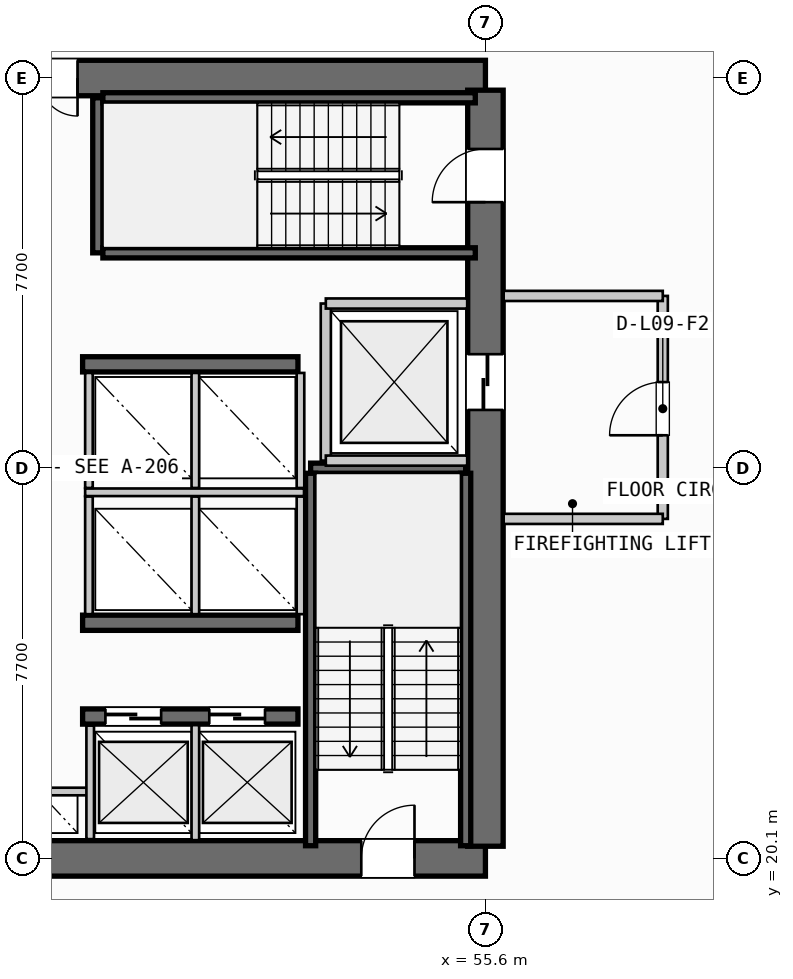
"""IFC4 building model, lengths in metres.
Left out: names, types, materials, properties, quantities, classifications, styles, units other than length and angle.
Written with IfcOpenShell. Run it as: python <this file> out.ifc"""

import sys

from ifc_helpers import new_model, si_unit, direction, frame, frame_2d, origin, place, context, subcontext, project, spatial, rectangle, extrude, source, transform, mapped, element, fill, save


model = new_model("IFC4")
c1 = context("Model", 3, precision=1e-05, world=origin(), true_north=direction((0.0, 1.0)))
c2 = subcontext(c1, "Body", "Model", "MODEL_VIEW")
j1 = project(units=[si_unit("LENGTHUNIT", "METRE"), si_unit("PLANEANGLEUNIT", "RADIAN")], contexts=[c1])
p1 = place(None, origin())
s1 = spatial("IfcSite", under=j1, at=p1, CompositionType="ELEMENT")
p2 = place(p1, origin())
s2 = spatial("IfcBuilding", under=s1, at=p2, CompositionType="ELEMENT")
p3 = place(p2, frame((0.0, 0.0, 41.0)))
s3 = spatial("IfcBuildingStorey", under=s2, at=p3, CompositionType="ELEMENT", Elevation=41.0)
p4 = place(p3, frame((38.0, 20.1, 0.0), z_axis=(0.0, 0.0, 1.0), x_axis=(1.0, 0.0, 0.0)))
e1 = element("IfcWall", 1, at=p4, inside=s3, PredefinedType="SHEAR", context=c2, shape_type="SweptSolid", body=[
    extrude(rectangle(XDim=17.6, YDim=0.7, at=frame_2d((8.8, 0.0))), origin(), (0.0, 0.0, 1.0), 3.55),
])
p5 = place(p4, frame((1.4, 0.0, 0.0)))
e2 = element("IfcOpeningElement", 2, at=p5, cuts=e1, PredefinedType="OPENING", context=c2, shape_type="SweptSolid", body=[
    extrude(rectangle(XDim=1.05, YDim=2.15, at=frame_2d((0.525, 1.075))), frame((0.0, 0.36, 0.0), z_axis=(0.0, -1.0, 0.0), x_axis=(1.0, 0.0, 0.0)), (0.0, 0.0, 1.0), 0.72),
])
p6 = place(p4, frame((15.15, 0.0, 0.0)))
e3 = element("IfcOpeningElement", 3, at=p6, cuts=e1, PredefinedType="OPENING", context=c2, shape_type="SweptSolid", body=[
    extrude(rectangle(XDim=1.05, YDim=2.15, at=frame_2d((0.525, 1.075))), frame((0.0, 0.36, 0.0), z_axis=(0.0, -1.0, 0.0), x_axis=(1.0, 0.0, 0.0)), (0.0, 0.0, 1.0), 0.72),
])
p7 = place(p3, frame((55.6, 35.5, 0.0), z_axis=(0.0, 0.0, 1.0), x_axis=(-1.0, 0.0, 0.0)))
e4 = element("IfcWall", 4, at=p7, inside=s3, PredefinedType="SHEAR", context=c2, shape_type="SweptSolid", body=[
    extrude(rectangle(XDim=17.6, YDim=0.7, at=frame_2d((8.8, 0.0))), origin(), (0.0, 0.0, 1.0), 3.55),
])
p8 = place(p7, frame((8.05, 0.0, 0.0)))
e5 = element("IfcOpeningElement", 5, at=p8, cuts=e4, PredefinedType="OPENING", context=c2, shape_type="SweptSolid", body=[
    extrude(rectangle(XDim=1.5, YDim=2.2, at=frame_2d((0.75, 1.1))), frame((0.0, 0.36, 0.0), z_axis=(0.0, -1.0, 0.0), x_axis=(1.0, 0.0, 0.0)), (0.0, 0.0, 1.0), 0.72),
])
p9 = place(p7, frame((14.95, 0.0, 0.0)))
e6 = element("IfcOpeningElement", 6, at=p9, cuts=e4, PredefinedType="OPENING", context=c2, shape_type="SweptSolid", body=[
    extrude(rectangle(XDim=1.4, YDim=2.3, at=frame_2d((0.7, 1.15))), frame((0.0, 0.36, 0.0), z_axis=(0.0, -1.0, 0.0), x_axis=(1.0, 0.0, 0.0)), (0.0, 0.0, 1.0), 0.72),
])
p10 = place(p7, frame((12.9, 0.0, 0.0)))
e7 = element("IfcOpeningElement", 7, at=p10, cuts=e4, PredefinedType="OPENING", context=c2, shape_type="SweptSolid", body=[
    extrude(rectangle(XDim=0.9, YDim=2.15, at=frame_2d((0.45, 1.075))), frame((0.0, 0.36, 0.0), z_axis=(0.0, -1.0, 0.0), x_axis=(1.0, 0.0, 0.0)), (0.0, 0.0, 1.0), 0.72),
])
p11 = place(p7, frame((10.6, 0.0, 0.0)))
e8 = element("IfcOpeningElement", 8, at=p11, cuts=e4, PredefinedType="OPENING", context=c2, shape_type="SweptSolid", body=[
    extrude(rectangle(XDim=0.95, YDim=2.15, at=frame_2d((0.475, 1.075))), frame((0.0, 0.36, 0.0), z_axis=(0.0, -1.0, 0.0), x_axis=(1.0, 0.0, 0.0)), (0.0, 0.0, 1.0), 0.72),
])
p12 = place(p3, frame((55.6, 20.34, 0.0), z_axis=(0.0, 0.0, 1.0), x_axis=(0.0, 1.0, 0.0)))
e9 = element("IfcWall", 9, at=p12, inside=s3, PredefinedType="SHEAR", context=c2, shape_type="SweptSolid", body=[
    extrude(rectangle(XDim=14.92, YDim=0.7, at=frame_2d((7.46, 0.0))), origin(), (0.0, 0.0, 1.0), 3.55),
])
p13 = place(p12, frame((12.71, 0.0, 0.0)))
e10 = element("IfcOpeningElement", 10, at=p13, cuts=e9, PredefinedType="OPENING", context=c2, shape_type="SweptSolid", body=[
    extrude(rectangle(XDim=1.05, YDim=2.15, at=frame_2d((0.525, 1.075))), frame((0.0, 0.36, 0.0), z_axis=(0.0, -1.0, 0.0), x_axis=(1.0, 0.0, 0.0)), (0.0, 0.0, 1.0), 0.72),
])
p14 = place(p12, frame((8.61, 0.0, 0.0)))
e11 = element("IfcOpeningElement", 11, at=p14, cuts=e9, PredefinedType="OPENING", context=c2, shape_type="SweptSolid", body=[
    extrude(rectangle(XDim=1.1, YDim=2.2, at=frame_2d((0.55, 1.1))), frame((0.0, 0.36, 0.0), z_axis=(0.0, -1.0, 0.0), x_axis=(1.0, 0.0, 0.0)), (0.0, 0.0, 1.0), 0.72),
])
p15 = place(p3, frame((47.65, 22.9, 0.0), z_axis=(0.0, 0.0, 1.0), x_axis=(1.0, 0.0, 0.0)))
e12 = element("IfcWall", 12, at=p15, inside=s3, PredefinedType="SHEAR", context=c2, shape_type="SweptSolid", body=[
    extrude(rectangle(XDim=4.25, YDim=0.3, at=frame_2d((2.125, 0.0))), origin(), (0.0, 0.0, 1.0), 3.55),
])
p16 = place(p15, frame((0.45, 0.0, 0.0)))
e13 = element("IfcOpeningElement", 13, at=p16, cuts=e12, PredefinedType="OPENING", context=c2, shape_type="SweptSolid", body=[
    extrude(rectangle(XDim=1.1, YDim=2.2, at=frame_2d((0.55, 1.1))), frame((0.0, 0.16, 0.0), z_axis=(0.0, -1.0, 0.0), x_axis=(1.0, 0.0, 0.0)), (0.0, 0.0, 1.0), 0.32),
])
p17 = place(p15, frame((2.5, 0.0, 0.0)))
e14 = element("IfcOpeningElement", 14, at=p17, cuts=e12, PredefinedType="OPENING", context=c2, shape_type="SweptSolid", body=[
    extrude(rectangle(XDim=1.1, YDim=2.2, at=frame_2d((0.55, 1.1))), frame((0.0, 0.16, 0.0), z_axis=(0.0, -1.0, 0.0), x_axis=(1.0, 0.0, 0.0)), (0.0, 0.0, 1.0), 0.32),
])
for number, where, z_axis, x_axis in (
    (15, (47.65, 24.75, 0.0), (0.0, 0.0, 1.0), (1.0, 0.0, 0.0)),
    (16, (47.65, 29.85, 0.0), (0.0, 0.0, 1.0), (1.0, 0.0, 0.0)),
):
    element("IfcWall", number, at=place(p3, frame(where, z_axis=z_axis, x_axis=x_axis)), inside=s3, PredefinedType="SHEAR", context=c2, shape_type="SweptSolid", body=[
        extrude(rectangle(XDim=4.25, YDim=0.3, at=frame_2d((2.125, 0.0))), origin(), (0.0, 0.0, 1.0), 3.55),
    ])
p18 = place(p3, frame((52.15, 27.8, 0.0), z_axis=(0.0, 0.0, 1.0), x_axis=(1.0, 0.0, 0.0)))
e17 = element("IfcWall", 17, at=p18, inside=s3, PredefinedType="SHEAR", context=c2, shape_type="SweptSolid", body=[
    extrude(rectangle(XDim=3.06, YDim=0.2, at=frame_2d((1.53, 0.0))), origin(), (0.0, 0.0, 1.0), 3.55),
])
for number, where, z_axis, x_axis in (
    (18, (55.21, 27.7, 0.0), (0.0, 0.0, 1.0), (0.0, -1.0, 0.0)),
    (19, (52.15, 20.35, 0.0), (0.0, 0.0, 1.0), (0.0, 1.0, 0.0)),
):
    element("IfcWall", number, at=place(p3, frame(where, z_axis=z_axis, x_axis=x_axis)), inside=s3, PredefinedType="SHEAR", context=c2, shape_type="SweptSolid", body=[
        extrude(rectangle(XDim=7.35, YDim=0.2, at=frame_2d((3.675, 0.0))), origin(), (0.0, 0.0, 1.0), 3.55),
    ])
p19 = place(p3, frame((47.95, 32.05, 0.0), z_axis=(0.0, 0.0, 1.0), x_axis=(0.0, 1.0, 0.0)))
e20 = element("IfcWall", 20, at=p19, inside=s3, PredefinedType="SHEAR", context=c2, shape_type="SweptSolid", body=[
    extrude(rectangle(XDim=3.06, YDim=0.2, at=frame_2d((1.53, 0.0))), origin(), (0.0, 0.0, 1.0), 3.55),
])
for number, where, z_axis, x_axis in (
    (21, (48.05, 35.11, 0.0), (0.0, 0.0, 1.0), (1.0, 0.0, 0.0)),
    (22, (55.4, 32.05, 0.0), (0.0, 0.0, 1.0), (-1.0, 0.0, 0.0)),
):
    element("IfcWall", number, at=place(p3, frame(where, z_axis=z_axis, x_axis=x_axis)), inside=s3, PredefinedType="SHEAR", context=c2, shape_type="SweptSolid", body=[
        extrude(rectangle(XDim=7.35, YDim=0.2, at=frame_2d((3.675, 0.0))), origin(), (0.0, 0.0, 1.0), 3.55),
    ])
p20 = place(p3, frame((45.8, 21.42, 0.0), z_axis=(0.0, 0.0, 1.0), x_axis=(1.0, 0.0, 0.0)))
e23 = element("IfcWall", 23, at=p20, inside=s3, PredefinedType="PARTITIONING", context=c2, shape_type="SweptSolid", body=[
    extrude(rectangle(XDim=2.0, YDim=0.15, at=frame_2d((1.0, 0.0))), origin(), (0.0, 0.0, 1.0), 2.785),
])
p21 = place(p3, frame((47.8, 20.48, 0.0), z_axis=(0.0, 0.0, 1.0), x_axis=(0.0, 1.0, 0.0)))
e24 = element("IfcWall", 24, at=p21, inside=s3, PredefinedType="PARTITIONING", context=c2, shape_type="SweptSolid", body=[
    extrude(rectangle(XDim=2.24, YDim=0.15, at=frame_2d((1.12, 0.0))), origin(), (0.0, 0.0, 1.0), 2.785),
])
p22 = place(p3, frame((52.45, 27.95, 0.0), z_axis=(0.0, 0.0, 1.0), x_axis=(0.0, 1.0, 0.0)))
e25 = element("IfcWall", 25, at=p22, inside=s3, PredefinedType="PARTITIONING", context=c2, shape_type="SweptSolid", body=[
    extrude(rectangle(XDim=3.1, YDim=0.2, at=frame_2d((1.55, 0.0))), origin(), (0.0, 0.0, 1.0), 2.785),
])
for number, where, z_axis, x_axis in (
    (26, (52.45, 27.95, 0.0), (0.0, 0.0, 1.0), (1.0, 0.0, 0.0)),
    (27, (52.45, 31.05, 0.0), (0.0, 0.0, 1.0), (1.0, 0.0, 0.0)),
):
    element("IfcWall", number, at=place(p3, frame(where, z_axis=z_axis, x_axis=x_axis)), inside=s3, PredefinedType="PARTITIONING", context=c2, shape_type="SweptSolid", body=[
        extrude(rectangle(XDim=2.79, YDim=0.2, at=frame_2d((1.395, 0.0))), origin(), (0.0, 0.0, 1.0), 2.785),
    ])
p23 = place(p3, frame((59.1, 26.8, 0.0), z_axis=(0.0, 0.0, 1.0), x_axis=(0.0, 1.0, 0.0)))
e28 = element("IfcWall", 28, at=p23, inside=s3, PredefinedType="PARTITIONING", context=c2, shape_type="SweptSolid", body=[
    extrude(rectangle(XDim=4.4, YDim=0.2, at=frame_2d((2.2, 0.0))), origin(), (0.0, 0.0, 1.0), 2.785),
])
p24 = place(p23, frame((1.65, 0.0, 0.0)))
e29 = element("IfcOpeningElement", 29, at=p24, cuts=e28, PredefinedType="OPENING", context=c2, shape_type="SweptSolid", body=[
    extrude(rectangle(XDim=1.05, YDim=2.15, at=frame_2d((0.525, 1.075))), frame((0.0, 0.11, 0.0), z_axis=(0.0, -1.0, 0.0), x_axis=(1.0, 0.0, 0.0)), (0.0, 0.0, 1.0), 0.22),
])
for number, where, z_axis, x_axis in (
    (30, (55.96, 26.8, 0.0), (0.0, 0.0, 1.0), (1.0, 0.0, 0.0)),
    (31, (55.96, 31.2, 0.0), (0.0, 0.0, 1.0), (1.0, 0.0, 0.0)),
):
    element("IfcWall", number, at=place(p3, frame(where, z_axis=z_axis, x_axis=x_axis)), inside=s3, PredefinedType="PARTITIONING", context=c2, shape_type="SweptSolid", body=[
        extrude(rectangle(XDim=3.14, YDim=0.2, at=frame_2d((1.57, 0.0))), origin(), (0.0, 0.0, 1.0), 2.785),
    ])
p25 = place(p3, frame((49.875, 20.46, 0.0), z_axis=(0.0, 0.0, 1.0), x_axis=(0.0, 1.0, 0.0)))
e32 = element("IfcWall", 32, at=p25, inside=s3, PredefinedType="PARTITIONING", context=c2, shape_type="SweptSolid", body=[
    extrude(rectangle(XDim=2.27, YDim=0.15, at=frame_2d((1.135, 0.0))), origin(), (0.0, 0.0, 1.0), 2.785),
])
p26 = place(p3, frame((47.7, 27.325, 0.0), z_axis=(0.0, 0.0, 1.0), x_axis=(1.0, 0.0, 0.0)))
e33 = element("IfcWall", 33, at=p26, inside=s3, PredefinedType="PARTITIONING", context=c2, shape_type="SweptSolid", body=[
    extrude(rectangle(XDim=4.32, YDim=0.15, at=frame_2d((2.16, 0.0))), origin(), (0.0, 0.0, 1.0), 2.785),
])
for number, where, z_axis, x_axis in (
    (34, (47.775, 24.92, 0.0), (0.0, 0.0, 1.0), (0.0, 1.0, 0.0)),
    (35, (49.875, 24.92, 0.0), (0.0, 0.0, 1.0), (0.0, 1.0, 0.0)),
    (36, (51.95, 24.92, 0.0), (0.0, 0.0, 1.0), (0.0, 1.0, 0.0)),
):
    element("IfcWall", number, at=place(p3, frame(where, z_axis=z_axis, x_axis=x_axis)), inside=s3, PredefinedType="PARTITIONING", context=c2, shape_type="SweptSolid", body=[
        extrude(rectangle(XDim=2.32, YDim=0.15, at=frame_2d((1.16, 0.0))), origin(), (0.0, 0.0, 1.0), 2.785),
    ])
for number, where, z_axis, x_axis in (
    (37, (47.775, 27.41, 0.0), (0.0, 0.0, 1.0), (0.0, 1.0, 0.0)),
    (38, (49.875, 27.41, 0.0), (0.0, 0.0, 1.0), (0.0, 1.0, 0.0)),
    (39, (51.95, 27.41, 0.0), (0.0, 0.0, 1.0), (0.0, 1.0, 0.0)),
):
    element("IfcWall", number, at=place(p3, frame(where, z_axis=z_axis, x_axis=x_axis)), inside=s3, PredefinedType="PARTITIONING", context=c2, shape_type="SweptSolid", body=[
        extrude(rectangle(XDim=2.27, YDim=0.15, at=frame_2d((1.135, 0.0))), origin(), (0.0, 0.0, 1.0), 2.785),
    ])
m1 = source(origin(), c2, "Body", "SweptSolid", [
    extrude(rectangle(XDim=1.05, YDim=2.15, at=frame_2d((0.525, 1.075))), frame((0.0, 0.025, 0.0), z_axis=(0.0, -1.0, 0.0), x_axis=(1.0, 0.0, 0.0)), (0.0, 0.0, 1.0), 0.05),
])
p27 = place(p6, origin())
e40 = element("IfcDoor", 40, at=p27, inside=s3, OperationType="SINGLE_SWING_RIGHT", PredefinedType="DOOR", context=c2, shape_type="MappedRepresentation", body=[
    mapped(m1, transform((0.0, 0.0, 0.0), scale=1.0)),
])
fill(e3, e40)
p28 = place(p13, origin())
e41 = element("IfcDoor", 41, at=p28, inside=s3, OperationType="SINGLE_SWING_LEFT", PredefinedType="DOOR", context=c2, shape_type="MappedRepresentation", body=[
    mapped(m1, transform((0.0, 0.0, 0.0), scale=1.0)),
])
fill(e10, e41)
m2 = source(origin(), c2, "Body", "SweptSolid", [
    extrude(rectangle(XDim=1.5, YDim=2.2, at=frame_2d((0.75, 1.1))), frame((0.0, 0.025, 0.0), z_axis=(0.0, -1.0, 0.0), x_axis=(1.0, 0.0, 0.0)), (0.0, 0.0, 1.0), 0.05),
])
p29 = place(p8, origin())
e42 = element("IfcDoor", 42, at=p29, inside=s3, OperationType="DOUBLE_DOOR_SINGLE_SWING", PredefinedType="DOOR", context=c2, shape_type="MappedRepresentation", body=[
    mapped(m2, transform((0.0, 0.0, 0.0), scale=1.0)),
])
fill(e5, e42)
m3 = source(origin(), c2, "Body", "SweptSolid", [
    extrude(rectangle(XDim=1.1, YDim=2.2, at=frame_2d((0.55, 1.1))), frame((0.0, 0.025, 0.0), z_axis=(0.0, -1.0, 0.0), x_axis=(1.0, 0.0, 0.0)), (0.0, 0.0, 1.0), 0.05),
])
p30 = place(p14, origin())
e43 = element("IfcDoor", 43, at=p30, inside=s3, OperationType="SLIDING_TO_RIGHT", PredefinedType="DOOR", context=c2, shape_type="MappedRepresentation", body=[
    mapped(m3, transform((0.0, 0.0, 0.0), scale=1.0)),
])
fill(e11, e43)
p31 = place(p16, origin())
e44 = element("IfcDoor", 44, at=p31, inside=s3, OperationType="SLIDING_TO_LEFT", PredefinedType="DOOR", context=c2, shape_type="MappedRepresentation", body=[
    mapped(m3, transform((0.0, 0.0, 0.0), scale=1.0)),
])
fill(e13, e44)
p32 = place(p17, origin())
e45 = element("IfcDoor", 45, at=p32, inside=s3, OperationType="SLIDING_TO_LEFT", PredefinedType="DOOR", context=c2, shape_type="MappedRepresentation", body=[
    mapped(m3, transform((0.0, 0.0, 0.0), scale=1.0)),
])
fill(e14, e45)
p33 = place(p24, origin())
e46 = element("IfcDoor", 46, at=p33, inside=s3, OperationType="SINGLE_SWING_LEFT", PredefinedType="DOOR", context=c2, shape_type="MappedRepresentation", body=[
    mapped(m1, transform((0.0, 0.0, 0.0), scale=1.0)),
])
fill(e29, e46)
save(model, sys.argv[1])
